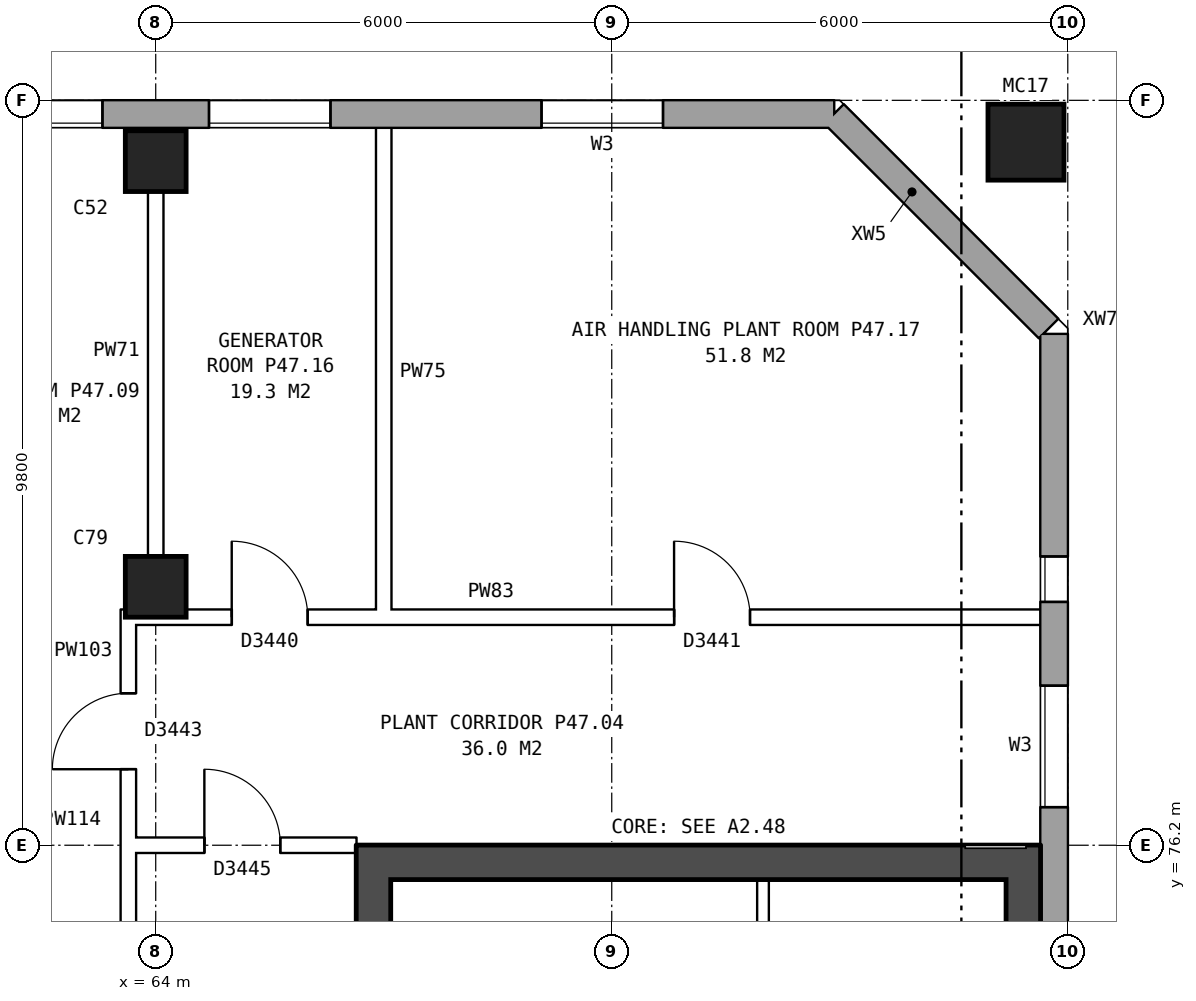
"""IFC4 building model, lengths in metres.
Left out: names, types, materials, properties, quantities, classifications, styles, units other than length and angle.
Written with IfcOpenShell. Run it as: python <this file> out.ifc"""

import sys

from ifc_helpers import new_model, si_unit, direction, frame, frame_2d, origin, origin_2d, place, context, subcontext, project, spatial, rectangle, hollow_rectangle, extrude, element, fill, save


model = new_model("IFC4")
c1 = context("Model", 3, precision=1e-05, world=origin(), true_north=direction((0.0, 1.0)))
c2 = subcontext(c1, "Body", "Model", "MODEL_VIEW")
j1 = project(units=[si_unit("LENGTHUNIT", "METRE"), si_unit("PLANEANGLEUNIT", "RADIAN")], contexts=[c1])
p1 = place(None, origin())
s1 = spatial("IfcSite", under=j1, at=p1, CompositionType="ELEMENT")
p2 = place(p1, origin())
s2 = spatial("IfcBuilding", under=s1, at=p2, CompositionType="ELEMENT")
p3 = place(p2, frame((0.0, 0.0, 167.1)))
s3 = spatial("IfcBuildingStorey", under=s2, at=p3, CompositionType="ELEMENT", Elevation=167.1)
for number, where, z_axis, x_axis in (
    (1, (64.0, 79.6, 0.0), (0.0, 0.0, 1.0), (1.0, 0.0, 0.0)),
    (2, (64.0, 85.2, 0.0), (0.0, 0.0, 1.0), (1.0, 0.0, 0.0)),
):
    element("IfcColumn", number, at=place(p3, frame(where, z_axis=z_axis, x_axis=x_axis)), inside=s3, PredefinedType="COLUMN", context=c2, shape_type="SweptSolid", body=[
        extrude(rectangle(XDim=0.8, YDim=0.8, at=origin_2d()), origin(), (0.0, 0.0, 1.0), 4.2),
    ])
p4 = place(p3, frame((75.45, 85.45, 0.0), z_axis=(0.0, 0.0, 1.0), x_axis=(1.0, 0.0, 0.0)))
e3 = element("IfcColumn", 3, at=p4, inside=s3, PredefinedType="COLUMN", context=c2, shape_type="SweptSolid", body=[
    extrude(hollow_rectangle(XDim=1.0, YDim=1.0, WallThickness=0.055, at=origin_2d()), origin(), (0.0, 0.0, 1.0), 4.5),
])
p5 = place(p3, frame((75.82, 57.075, 0.0), z_axis=(0.0, 0.0, 1.0), x_axis=(0.0, 1.0, 0.0)))
e4 = element("IfcWall", 4, at=p5, inside=s3, PredefinedType="STANDARD", context=c2, shape_type="SweptSolid", body=[
    extrude(rectangle(XDim=25.851, YDim=0.36, at=frame_2d((12.925, 0.0))), origin(), (0.0, 0.0, 1.0), 4.2),
])
p6 = place(p5, frame((2.9, 0.0, 1.5)))
e5 = element("IfcOpeningElement", 5, at=p6, cuts=e4, PredefinedType="OPENING", context=c2, shape_type="SweptSolid", body=[
    extrude(rectangle(XDim=0.6, YDim=1.2, at=frame_2d((0.3, 0.6))), frame((0.0, 0.19, 0.0), z_axis=(0.0, -1.0, 0.0), x_axis=(1.0, 0.0, 0.0)), (0.0, 0.0, 1.0), 0.38),
])
p7 = place(p5, frame((3.925, 0.0, 1.5)))
e6 = element("IfcOpeningElement", 6, at=p7, cuts=e4, PredefinedType="OPENING", context=c2, shape_type="SweptSolid", body=[
    extrude(rectangle(XDim=0.6, YDim=1.2, at=frame_2d((0.3, 0.6))), frame((0.0, 0.19, 0.0), z_axis=(0.0, -1.0, 0.0), x_axis=(1.0, 0.0, 0.0)), (0.0, 0.0, 1.0), 0.38),
])
p8 = place(p5, frame((19.625, 0.0, 1.5)))
e7 = element("IfcOpeningElement", 7, at=p8, cuts=e4, PredefinedType="OPENING", context=c2, shape_type="SweptSolid", body=[
    extrude(rectangle(XDim=1.6, YDim=1.2, at=frame_2d((0.8, 0.6))), frame((0.0, 0.19, 0.0), z_axis=(0.0, -1.0, 0.0), x_axis=(1.0, 0.0, 0.0)), (0.0, 0.0, 1.0), 0.38),
])
p9 = place(p5, frame((22.325, 0.0, 1.5)))
e8 = element("IfcOpeningElement", 8, at=p9, cuts=e4, PredefinedType="OPENING", context=c2, shape_type="SweptSolid", body=[
    extrude(rectangle(XDim=0.6, YDim=1.2, at=frame_2d((0.3, 0.6))), frame((0.0, 0.19, 0.0), z_axis=(0.0, -1.0, 0.0), x_axis=(1.0, 0.0, 0.0)), (0.0, 0.0, 1.0), 0.38),
])
p10 = place(p3, frame((75.746, 82.999, 0.953), z_axis=(0.0, 0.0, 1.0), x_axis=(-0.706994764273, 0.707218780358, 0.0)))
e9 = element("IfcWall", 9, at=p10, inside=s3, PredefinedType="STANDARD", context=c2, shape_type="SweptSolid", body=[
    extrude(rectangle(XDim=1.09, YDim=0.36, at=frame_2d((0.545, 0.0))), origin(), (0.0, 0.0, 1.0), 2.444),
])
p11 = place(p3, frame((74.976, 83.77, 0.0), z_axis=(0.0, 0.0, 1.0), x_axis=(-0.707148882153, 0.707064677713, 0.0)))
e10 = element("IfcWall", 10, at=p11, inside=s3, PredefinedType="STANDARD", context=c2, shape_type="SweptSolid", body=[
    extrude(rectangle(XDim=2.899, YDim=0.36, at=frame_2d((1.45, 0.0))), origin(), (0.0, 0.0, 1.0), 4.2),
])
p12 = place(p3, frame((72.925, 85.82, 0.0), z_axis=(0.0, 0.0, 1.0), x_axis=(-1.0, 0.0, 0.0)))
e11 = element("IfcWall", 11, at=p12, inside=s3, PredefinedType="STANDARD", context=c2, shape_type="SweptSolid", body=[
    extrude(rectangle(XDim=39.601, YDim=0.36, at=frame_2d((19.8, 0.0))), origin(), (0.0, 0.0, 1.0), 4.2),
])
p13 = place(p12, frame((2.25, 0.0, 1.5)))
e12 = element("IfcOpeningElement", 12, at=p13, cuts=e11, PredefinedType="OPENING", context=c2, shape_type="SweptSolid", body=[
    extrude(rectangle(XDim=1.6, YDim=1.2, at=frame_2d((0.8, 0.6))), frame((0.0, 0.19, 0.0), z_axis=(0.0, -1.0, 0.0), x_axis=(1.0, 0.0, 0.0)), (0.0, 0.0, 1.0), 0.38),
])
p14 = place(p12, frame((6.625, 0.0, 1.5)))
e13 = element("IfcOpeningElement", 13, at=p14, cuts=e11, PredefinedType="OPENING", context=c2, shape_type="SweptSolid", body=[
    extrude(rectangle(XDim=1.6, YDim=1.2, at=frame_2d((0.8, 0.6))), frame((0.0, 0.19, 0.0), z_axis=(0.0, -1.0, 0.0), x_axis=(1.0, 0.0, 0.0)), (0.0, 0.0, 1.0), 0.38),
])
p15 = place(p12, frame((9.625, 0.0, 1.5)))
e14 = element("IfcOpeningElement", 14, at=p15, cuts=e11, PredefinedType="OPENING", context=c2, shape_type="SweptSolid", body=[
    extrude(rectangle(XDim=1.6, YDim=1.2, at=frame_2d((0.8, 0.6))), frame((0.0, 0.19, 0.0), z_axis=(0.0, -1.0, 0.0), x_axis=(1.0, 0.0, 0.0)), (0.0, 0.0, 1.0), 0.38),
])
p16 = place(p12, frame((13.875, 0.0, 1.5)))
e15 = element("IfcOpeningElement", 15, at=p16, cuts=e11, PredefinedType="OPENING", context=c2, shape_type="SweptSolid", body=[
    extrude(rectangle(XDim=0.6, YDim=1.2, at=frame_2d((0.3, 0.6))), frame((0.0, 0.19, 0.0), z_axis=(0.0, -1.0, 0.0), x_axis=(1.0, 0.0, 0.0)), (0.0, 0.0, 1.0), 0.38),
])
p17 = place(p12, frame((15.125, 0.0, 1.5)))
e16 = element("IfcOpeningElement", 16, at=p17, cuts=e11, PredefinedType="OPENING", context=c2, shape_type="SweptSolid", body=[
    extrude(rectangle(XDim=0.6, YDim=1.2, at=frame_2d((0.3, 0.6))), frame((0.0, 0.19, 0.0), z_axis=(0.0, -1.0, 0.0), x_axis=(1.0, 0.0, 0.0)), (0.0, 0.0, 1.0), 0.38),
])
p18 = place(p12, frame((18.625, 0.0, 1.5)))
e17 = element("IfcOpeningElement", 17, at=p18, cuts=e11, PredefinedType="OPENING", context=c2, shape_type="SweptSolid", body=[
    extrude(rectangle(XDim=1.6, YDim=1.2, at=frame_2d((0.8, 0.6))), frame((0.0, 0.19, 0.0), z_axis=(0.0, -1.0, 0.0), x_axis=(1.0, 0.0, 0.0)), (0.0, 0.0, 1.0), 0.38),
])
p19 = place(p12, frame((21.625, 0.0, 1.5)))
e18 = element("IfcOpeningElement", 18, at=p19, cuts=e11, PredefinedType="OPENING", context=c2, shape_type="SweptSolid", body=[
    extrude(rectangle(XDim=1.6, YDim=1.2, at=frame_2d((0.8, 0.6))), frame((0.0, 0.19, 0.0), z_axis=(0.0, -1.0, 0.0), x_axis=(1.0, 0.0, 0.0)), (0.0, 0.0, 1.0), 0.38),
])
p20 = place(p12, frame((25.475, 0.0, 1.5)))
e19 = element("IfcOpeningElement", 19, at=p20, cuts=e11, PredefinedType="OPENING", context=c2, shape_type="SweptSolid", body=[
    extrude(rectangle(XDim=1.6, YDim=1.2, at=frame_2d((0.8, 0.6))), frame((0.0, 0.19, 0.0), z_axis=(0.0, -1.0, 0.0), x_axis=(1.0, 0.0, 0.0)), (0.0, 0.0, 1.0), 0.38),
])
p21 = place(p12, frame((30.625, 0.0, 1.5)))
e20 = element("IfcOpeningElement", 20, at=p21, cuts=e11, PredefinedType="OPENING", context=c2, shape_type="SweptSolid", body=[
    extrude(rectangle(XDim=1.6, YDim=1.2, at=frame_2d((0.8, 0.6))), frame((0.0, 0.19, 0.0), z_axis=(0.0, -1.0, 0.0), x_axis=(1.0, 0.0, 0.0)), (0.0, 0.0, 1.0), 0.38),
])
p22 = place(p12, frame((32.525, 0.0, 1.5)))
e21 = element("IfcOpeningElement", 21, at=p22, cuts=e11, PredefinedType="OPENING", context=c2, shape_type="SweptSolid", body=[
    extrude(rectangle(XDim=1.6, YDim=1.2, at=frame_2d((0.8, 0.6))), frame((0.0, 0.19, 0.0), z_axis=(0.0, -1.0, 0.0), x_axis=(1.0, 0.0, 0.0)), (0.0, 0.0, 1.0), 0.38),
])
p23 = place(p12, frame((37.075, 0.0, 1.5)))
e22 = element("IfcOpeningElement", 22, at=p23, cuts=e11, PredefinedType="OPENING", context=c2, shape_type="SweptSolid", body=[
    extrude(rectangle(XDim=1.6, YDim=1.2, at=frame_2d((0.8, 0.6))), frame((0.0, 0.19, 0.0), z_axis=(0.0, -1.0, 0.0), x_axis=(1.0, 0.0, 0.0)), (0.0, 0.0, 1.0), 0.38),
])
p24 = place(p3, frame((66.865, 63.8, 0.0), z_axis=(0.0, 0.0, 1.0), x_axis=(0.0, 1.0, 0.0)))
e23 = element("IfcWall", 23, at=p24, inside=s3, PredefinedType="SHEAR", context=c2, shape_type="SweptSolid", body=[
    extrude(rectangle(XDim=12.4, YDim=0.45, at=frame_2d((6.2, 0.0))), origin(), (0.0, 0.0, 1.0), 4.2),
])
p25 = place(p24, frame((1.325, 0.0, 0.0)))
e24 = element("IfcOpeningElement", 24, at=p25, cuts=e23, PredefinedType="OPENING", context=c2, shape_type="SweptSolid", body=[
    extrude(rectangle(XDim=1.1, YDim=2.1, at=frame_2d((0.55, 1.05))), frame((0.0, 0.235, 0.0), z_axis=(0.0, -1.0, 0.0), x_axis=(1.0, 0.0, 0.0)), (0.0, 0.0, 1.0), 0.47),
])
p26 = place(p24, frame((3.6, 0.0, 0.0)))
e25 = element("IfcOpeningElement", 25, at=p26, cuts=e23, PredefinedType="OPENING", context=c2, shape_type="SweptSolid", body=[
    extrude(rectangle(XDim=1.1, YDim=2.1, at=frame_2d((0.55, 1.05))), frame((0.0, 0.235, 0.0), z_axis=(0.0, -1.0, 0.0), x_axis=(1.0, 0.0, 0.0)), (0.0, 0.0, 1.0), 0.47),
])
p27 = place(p24, frame((5.8, 0.0, 0.0)))
e26 = element("IfcOpeningElement", 26, at=p27, cuts=e23, PredefinedType="OPENING", context=c2, shape_type="SweptSolid", body=[
    extrude(rectangle(XDim=1.1, YDim=2.1, at=frame_2d((0.55, 1.05))), frame((0.0, 0.235, 0.0), z_axis=(0.0, -1.0, 0.0), x_axis=(1.0, 0.0, 0.0)), (0.0, 0.0, 1.0), 0.47),
])
p28 = place(p24, frame((8.0, 0.0, 0.0)))
e27 = element("IfcOpeningElement", 27, at=p28, cuts=e23, PredefinedType="OPENING", context=c2, shape_type="SweptSolid", body=[
    extrude(rectangle(XDim=1.1, YDim=2.1, at=frame_2d((0.55, 1.05))), frame((0.0, 0.235, 0.0), z_axis=(0.0, -1.0, 0.0), x_axis=(1.0, 0.0, 0.0)), (0.0, 0.0, 1.0), 0.47),
])
p29 = place(p24, frame((9.9, 0.0, 0.0)))
e28 = element("IfcOpeningElement", 28, at=p29, cuts=e23, PredefinedType="OPENING", context=c2, shape_type="SweptSolid", body=[
    extrude(rectangle(XDim=1.1, YDim=2.1, at=frame_2d((0.55, 1.05))), frame((0.0, 0.235, 0.0), z_axis=(0.0, -1.0, 0.0), x_axis=(1.0, 0.0, 0.0)), (0.0, 0.0, 1.0), 0.47),
])
p30 = place(p3, frame((75.415, 63.8, 0.0), z_axis=(0.0, 0.0, 1.0), x_axis=(0.0, 1.0, 0.0)))
e29 = element("IfcWall", 29, at=p30, inside=s3, PredefinedType="SHEAR", context=c2, shape_type="SweptSolid", body=[
    extrude(rectangle(XDim=12.4, YDim=0.45, at=frame_2d((6.2, 0.0))), origin(), (0.0, 0.0, 1.0), 4.2),
])
p31 = place(p3, frame((67.09, 75.975, 0.0), z_axis=(0.0, 0.0, 1.0), x_axis=(1.0, 0.0, 0.0)))
e30 = element("IfcWall", 30, at=p31, inside=s3, PredefinedType="SHEAR", context=c2, shape_type="SweptSolid", body=[
    extrude(rectangle(XDim=8.1, YDim=0.45, at=frame_2d((4.05, 0.0))), origin(), (0.0, 0.0, 1.0), 4.2),
])
p32 = place(p3, frame((71.99, 73.45, 0.0), z_axis=(0.0, 0.0, 1.0), x_axis=(0.0, 1.0, 0.0)))
e31 = element("IfcWall", 31, at=p32, inside=s3, PredefinedType="PARTITIONING", context=c2, shape_type="SweptSolid", body=[
    extrude(rectangle(XDim=2.3, YDim=0.15, at=frame_2d((1.15, 0.0))), origin(), (0.0, 0.0, 1.0), 4.2),
])
p33 = place(p32, frame((0.725, 0.0, 0.0)))
e32 = element("IfcOpeningElement", 32, at=p33, cuts=e31, PredefinedType="OPENING", context=c2, shape_type="SweptSolid", body=[
    extrude(rectangle(XDim=0.85, YDim=2.1, at=frame_2d((0.425, 1.05))), frame((0.0, 0.085, 0.0), z_axis=(0.0, -1.0, 0.0), x_axis=(1.0, 0.0, 0.0)), (0.0, 0.0, 1.0), 0.17),
])
p34 = place(p3, frame((63.64, 63.9, 0.0), z_axis=(0.0, 0.0, 1.0), x_axis=(0.0, 1.0, 0.0)))
e33 = element("IfcWall", 33, at=p34, inside=s3, PredefinedType="PARTITIONING", context=c2, shape_type="SweptSolid", body=[
    extrude(rectangle(XDim=12.2, YDim=0.2, at=frame_2d((6.1, 0.0))), origin(), (0.0, 0.0, 1.0), 4.2),
])
p35 = place(p34, frame((5.1, 0.0, 0.0)))
e34 = element("IfcOpeningElement", 34, at=p35, cuts=e33, PredefinedType="OPENING", context=c2, shape_type="SweptSolid", body=[
    extrude(rectangle(XDim=2.0, YDim=2.1, at=frame_2d((1.0, 1.05))), frame((0.0, 0.11, 0.0), z_axis=(0.0, -1.0, 0.0), x_axis=(1.0, 0.0, 0.0)), (0.0, 0.0, 1.0), 0.22),
])
p36 = place(p3, frame((63.54, 76.2, 0.0), z_axis=(0.0, 0.0, 1.0), x_axis=(1.0, 0.0, 0.0)))
e35 = element("IfcWall", 35, at=p36, inside=s3, PredefinedType="PARTITIONING", context=c2, shape_type="SweptSolid", body=[
    extrude(rectangle(XDim=3.1, YDim=0.2, at=frame_2d((1.55, 0.0))), origin(), (0.0, 0.0, 1.0), 4.2),
])
p37 = place(p36, frame((1.1, 0.0, 0.0)))
e36 = element("IfcOpeningElement", 36, at=p37, cuts=e35, PredefinedType="OPENING", context=c2, shape_type="SweptSolid", body=[
    extrude(rectangle(XDim=1.0, YDim=2.1, at=frame_2d((0.5, 1.05))), frame((0.0, 0.11, 0.0), z_axis=(0.0, -1.0, 0.0), x_axis=(1.0, 0.0, 0.0)), (0.0, 0.0, 1.0), 0.22),
])
p38 = place(p3, frame((63.54, 79.2, 0.0), z_axis=(0.0, 0.0, 1.0), x_axis=(1.0, 0.0, 0.0)))
e37 = element("IfcWall", 37, at=p38, inside=s3, PredefinedType="PARTITIONING", context=c2, shape_type="SweptSolid", body=[
    extrude(rectangle(XDim=12.22, YDim=0.2, at=frame_2d((6.11, 0.0))), origin(), (0.0, 0.0, 1.0), 4.2),
])
p39 = place(p38, frame((1.46, 0.0, 0.0)))
e38 = element("IfcOpeningElement", 38, at=p39, cuts=e37, PredefinedType="OPENING", context=c2, shape_type="SweptSolid", body=[
    extrude(rectangle(XDim=1.0, YDim=2.1, at=frame_2d((0.5, 1.05))), frame((0.0, 0.11, 0.0), z_axis=(0.0, -1.0, 0.0), x_axis=(1.0, 0.0, 0.0)), (0.0, 0.0, 1.0), 0.22),
])
p40 = place(p38, frame((7.28, 0.0, 0.0)))
e39 = element("IfcOpeningElement", 39, at=p40, cuts=e37, PredefinedType="OPENING", context=c2, shape_type="SweptSolid", body=[
    extrude(rectangle(XDim=1.0, YDim=2.1, at=frame_2d((0.5, 1.05))), frame((0.0, 0.11, 0.0), z_axis=(0.0, -1.0, 0.0), x_axis=(1.0, 0.0, 0.0)), (0.0, 0.0, 1.0), 0.22),
])
p41 = place(p3, frame((63.64, 76.1, 0.0), z_axis=(0.0, 0.0, 1.0), x_axis=(0.0, 1.0, 0.0)))
e40 = element("IfcWall", 40, at=p41, inside=s3, PredefinedType="PARTITIONING", context=c2, shape_type="SweptSolid", body=[
    extrude(rectangle(XDim=3.2, YDim=0.2, at=frame_2d((1.6, 0.0))), origin(), (0.0, 0.0, 1.0), 4.2),
])
p42 = place(p41, frame((1.1, 0.0, 0.0)))
e41 = element("IfcOpeningElement", 41, at=p42, cuts=e40, PredefinedType="OPENING", context=c2, shape_type="SweptSolid", body=[
    extrude(rectangle(XDim=1.0, YDim=2.1, at=frame_2d((0.5, 1.05))), frame((0.0, 0.11, 0.0), z_axis=(0.0, -1.0, 0.0), x_axis=(1.0, 0.0, 0.0)), (0.0, 0.0, 1.0), 0.22),
])
for number, where, z_axis, x_axis in (
    (42, (64.0, 79.1, 0.0), (0.0, 0.0, 1.0), (0.0, 1.0, 0.0)),
    (43, (67.0, 79.1, 0.0), (0.0, 0.0, 1.0), (0.0, 1.0, 0.0)),
):
    element("IfcWall", number, at=place(p3, frame(where, z_axis=z_axis, x_axis=x_axis)), inside=s3, PredefinedType="PARTITIONING", context=c2, shape_type="SweptSolid", body=[
        extrude(rectangle(XDim=6.66, YDim=0.2, at=frame_2d((3.33, 0.0))), origin(), (0.0, 0.0, 1.0), 4.2),
    ])
p43 = place(p8, origin())
e44 = element("IfcWindow", 44, at=p43, inside=s3, PartitioningType="DOUBLE_PANEL_HORIZONTAL", PredefinedType="WINDOW", context=c2, shape_type="SweptSolid", body=[
    extrude(rectangle(XDim=1.6, YDim=1.2, at=frame_2d((0.8, 0.6))), frame((0.0, 0.15, 0.0), z_axis=(0.0, -1.0, 0.0), x_axis=(1.0, 0.0, 0.0)), (0.0, 0.0, 1.0), 0.06),
])
fill(e7, e44)
p44 = place(p9, origin())
e45 = element("IfcWindow", 45, at=p44, inside=s3, PartitioningType="DOUBLE_PANEL_HORIZONTAL", PredefinedType="WINDOW", context=c2, shape_type="SweptSolid", body=[
    extrude(rectangle(XDim=0.6, YDim=1.2, at=frame_2d((0.3, 0.6))), frame((0.0, 0.15, 0.0), z_axis=(0.0, -1.0, 0.0), x_axis=(1.0, 0.0, 0.0)), (0.0, 0.0, 1.0), 0.06),
])
fill(e8, e45)
p45 = place(p13, origin())
e46 = element("IfcWindow", 46, at=p45, inside=s3, PartitioningType="DOUBLE_PANEL_HORIZONTAL", PredefinedType="WINDOW", context=c2, shape_type="SweptSolid", body=[
    extrude(rectangle(XDim=1.6, YDim=1.2, at=frame_2d((0.8, 0.6))), frame((0.0, 0.15, 0.0), z_axis=(0.0, -1.0, 0.0), x_axis=(1.0, 0.0, 0.0)), (0.0, 0.0, 1.0), 0.06),
])
fill(e12, e46)
p46 = place(p14, origin())
e47 = element("IfcWindow", 47, at=p46, inside=s3, PartitioningType="DOUBLE_PANEL_HORIZONTAL", PredefinedType="WINDOW", context=c2, shape_type="SweptSolid", body=[
    extrude(rectangle(XDim=1.6, YDim=1.2, at=frame_2d((0.8, 0.6))), frame((0.0, 0.15, 0.0), z_axis=(0.0, -1.0, 0.0), x_axis=(1.0, 0.0, 0.0)), (0.0, 0.0, 1.0), 0.06),
])
fill(e13, e47)
p47 = place(p15, origin())
e48 = element("IfcWindow", 48, at=p47, inside=s3, PartitioningType="DOUBLE_PANEL_HORIZONTAL", PredefinedType="WINDOW", context=c2, shape_type="SweptSolid", body=[
    extrude(rectangle(XDim=1.6, YDim=1.2, at=frame_2d((0.8, 0.6))), frame((0.0, 0.15, 0.0), z_axis=(0.0, -1.0, 0.0), x_axis=(1.0, 0.0, 0.0)), (0.0, 0.0, 1.0), 0.06),
])
fill(e14, e48)
p48 = place(p37, origin())
e49 = element("IfcDoor", 49, at=p48, inside=s3, OperationType="SINGLE_SWING_LEFT", PredefinedType="DOOR", context=c2, shape_type="SweptSolid", body=[
    extrude(rectangle(XDim=1.0, YDim=2.1, at=frame_2d((0.5, 1.05))), frame((0.0, 0.025, 0.0), z_axis=(0.0, -1.0, 0.0), x_axis=(1.0, 0.0, 0.0)), (0.0, 0.0, 1.0), 0.05),
])
fill(e36, e49)
p49 = place(p39, origin())
e50 = element("IfcDoor", 50, at=p49, inside=s3, OperationType="SINGLE_SWING_LEFT", PredefinedType="DOOR", context=c2, shape_type="SweptSolid", body=[
    extrude(rectangle(XDim=1.0, YDim=2.1, at=frame_2d((0.5, 1.05))), frame((0.0, 0.025, 0.0), z_axis=(0.0, -1.0, 0.0), x_axis=(1.0, 0.0, 0.0)), (0.0, 0.0, 1.0), 0.05),
])
fill(e38, e50)
p50 = place(p40, origin())
e51 = element("IfcDoor", 51, at=p50, inside=s3, OperationType="SINGLE_SWING_LEFT", PredefinedType="DOOR", context=c2, shape_type="SweptSolid", body=[
    extrude(rectangle(XDim=1.0, YDim=2.1, at=frame_2d((0.5, 1.05))), frame((0.0, 0.025, 0.0), z_axis=(0.0, -1.0, 0.0), x_axis=(1.0, 0.0, 0.0)), (0.0, 0.0, 1.0), 0.05),
])
fill(e39, e51)
p51 = place(p42, origin())
e52 = element("IfcDoor", 52, at=p51, inside=s3, OperationType="SINGLE_SWING_LEFT", PredefinedType="DOOR", context=c2, shape_type="SweptSolid", body=[
    extrude(rectangle(XDim=1.0, YDim=2.1, at=frame_2d((0.5, 1.05))), frame((0.0, 0.025, 0.0), z_axis=(0.0, -1.0, 0.0), x_axis=(1.0, 0.0, 0.0)), (0.0, 0.0, 1.0), 0.05),
])
fill(e41, e52)
save(model, sys.argv[1])
